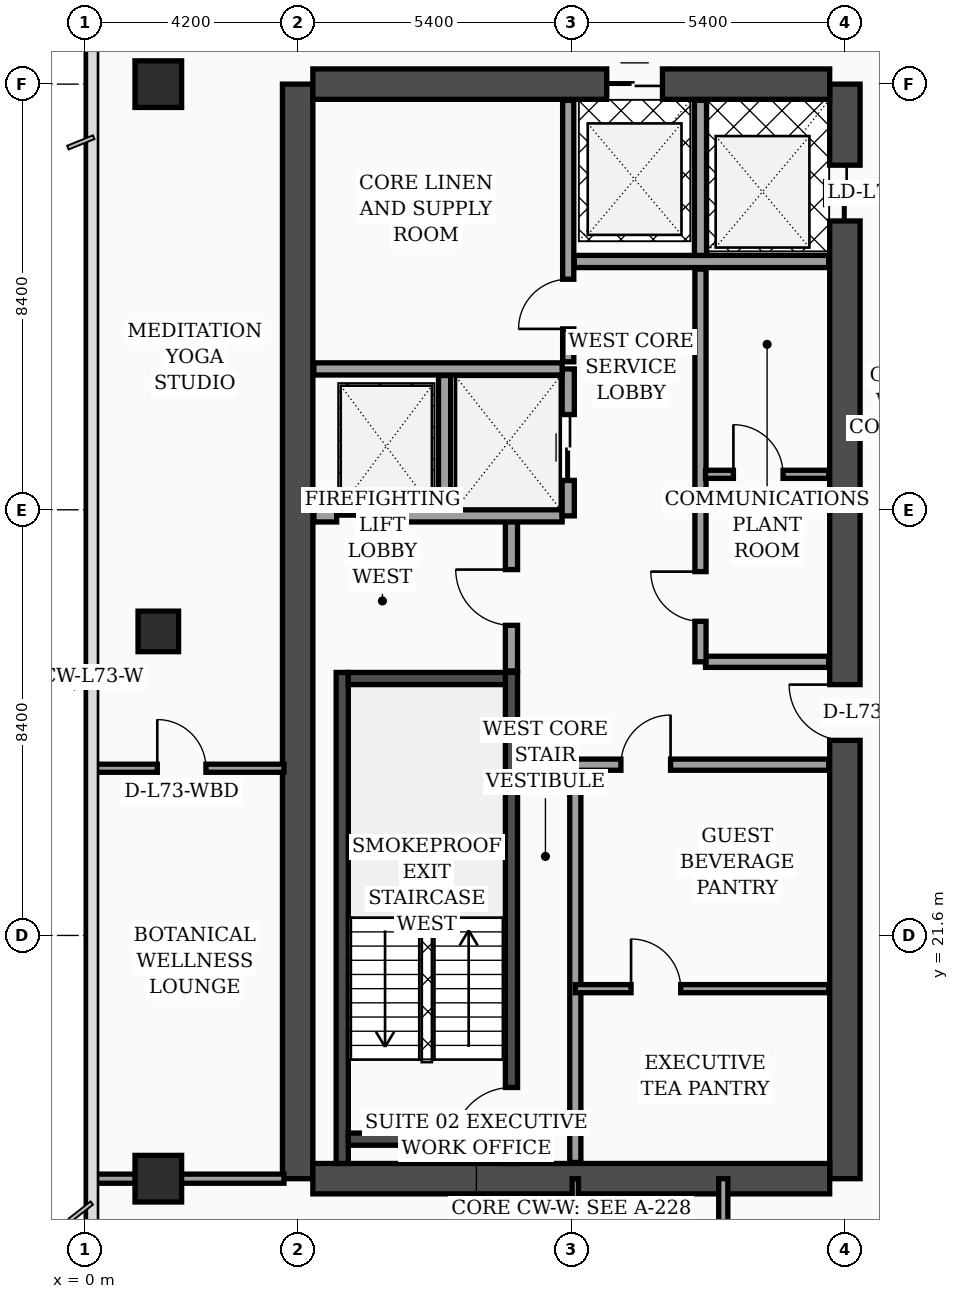
"""IFC4 building model, lengths in metres.
Left out: names, types, materials, properties, quantities, classifications, styles, units other than length and angle.
Written with IfcOpenShell. Run it as: python <this file> out.ifc"""

import sys

from ifc_helpers import new_model, si_unit, direction, frame, frame_2d, origin, origin_2d, place, context, subcontext, project, spatial, rectangle, extrude, element, fill, save


model = new_model("IFC4")
c1 = context("Model", 3, precision=1e-05, world=origin(), true_north=direction((0.0, 1.0)))
c2 = subcontext(c1, "Body", "Model", "MODEL_VIEW")
j1 = project(units=[si_unit("LENGTHUNIT", "METRE"), si_unit("PLANEANGLEUNIT", "RADIAN")], contexts=[c1])
p1 = place(None, origin())
s1 = spatial("IfcSite", under=j1, at=p1, CompositionType="ELEMENT")
p2 = place(p1, origin())
s2 = spatial("IfcBuilding", under=s1, at=p2, CompositionType="ELEMENT")
p3 = place(p2, frame((0.0, 0.0, 294.9)))
s3 = spatial("IfcBuildingStorey", under=s2, at=p3, CompositionType="ELEMENT", Elevation=294.9)
p4 = place(p3, frame((4.2, 16.8, 0.0), z_axis=(0.0, 0.0, 1.0), x_axis=(0.0, 1.0, 0.0)))
e1 = element("IfcWall", 1, at=p4, inside=s3, PredefinedType="SHEAR", context=c2, shape_type="SweptSolid", body=[
    extrude(rectangle(XDim=21.6, YDim=0.6, at=frame_2d((10.8, 0.0))), origin(), (0.0, 0.0, 1.0), 3.56),
])
p5 = place(p3, frame((15.0, 16.8, 0.0), z_axis=(0.0, 0.0, 1.0), x_axis=(0.0, 1.0, 0.0)))
e2 = element("IfcWall", 2, at=p5, inside=s3, PredefinedType="SHEAR", context=c2, shape_type="SweptSolid", body=[
    extrude(rectangle(XDim=21.6, YDim=0.6, at=frame_2d((10.8, 0.0))), origin(), (0.0, 0.0, 1.0), 3.56),
])
p6 = place(p5, frame((8.65, 0.0, 0.0)))
e3 = element("IfcOpeningElement", 3, at=p6, cuts=e2, PredefinedType="OPENING", context=c2, shape_type="SweptSolid", body=[
    extrude(rectangle(XDim=1.1, YDim=2.2, at=frame_2d((0.55, 1.1))), frame((0.0, 0.31, 0.0), z_axis=(0.0, -1.0, 0.0), x_axis=(1.0, 0.0, 0.0)), (0.0, 0.0, 1.0), 0.62),
])
p7 = place(p5, frame((18.9, 0.0, 0.0)))
e4 = element("IfcOpeningElement", 4, at=p7, cuts=e2, PredefinedType="OPENING", context=c2, shape_type="SweptSolid", body=[
    extrude(rectangle(XDim=1.1, YDim=2.2, at=frame_2d((0.55, 1.1))), frame((0.0, 0.31, 0.0), z_axis=(0.0, -1.0, 0.0), x_axis=(1.0, 0.0, 0.0)), (0.0, 0.0, 1.0), 0.62),
])
p8 = place(p3, frame((4.5, 38.4, 0.0), z_axis=(0.0, 0.0, 1.0), x_axis=(1.0, 0.0, 0.0)))
e5 = element("IfcWall", 5, at=p8, inside=s3, PredefinedType="SHEAR", context=c2, shape_type="SweptSolid", body=[
    extrude(rectangle(XDim=10.2, YDim=0.6, at=frame_2d((5.1, 0.0))), origin(), (0.0, 0.0, 1.0), 3.56),
])
p9 = place(p8, frame((5.8, 0.0, 0.0)))
e6 = element("IfcOpeningElement", 6, at=p9, cuts=e5, PredefinedType="OPENING", context=c2, shape_type="SweptSolid", body=[
    extrude(rectangle(XDim=1.1, YDim=2.2, at=frame_2d((0.55, 1.1))), frame((0.0, 0.31, 0.0), z_axis=(0.0, -1.0, 0.0), x_axis=(1.0, 0.0, 0.0)), (0.0, 0.0, 1.0), 0.62),
])
p10 = place(p3, frame((4.5, 16.8, 0.0), z_axis=(0.0, 0.0, 1.0), x_axis=(1.0, 0.0, 0.0)))
e7 = element("IfcWall", 7, at=p10, inside=s3, PredefinedType="SHEAR", context=c2, shape_type="SweptSolid", body=[
    extrude(rectangle(XDim=10.2, YDim=0.6, at=frame_2d((5.1, 0.0))), origin(), (0.0, 0.0, 1.0), 3.56),
])
p11 = place(p3, frame((5.08, 17.1, 0.0), z_axis=(0.0, 0.0, 1.0), x_axis=(0.0, 1.0, 0.0)))
e8 = element("IfcWall", 8, at=p11, inside=s3, PredefinedType="SOLIDWALL", context=c2, shape_type="SweptSolid", body=[
    extrude(rectangle(XDim=9.69, YDim=0.24, at=frame_2d((4.845, 0.0))), origin(), (0.0, 0.0, 1.0), 3.56),
])
p12 = place(p3, frame((8.42, 17.1, 0.0), z_axis=(0.0, 0.0, 1.0), x_axis=(0.0, 1.0, 0.0)))
e9 = element("IfcWall", 9, at=p12, inside=s3, PredefinedType="SOLIDWALL", context=c2, shape_type="SweptSolid", body=[
    extrude(rectangle(XDim=9.69, YDim=0.24, at=frame_2d((4.845, 0.0))), origin(), (0.0, 0.0, 1.0), 3.56),
])
p13 = place(p12, frame((0.35, 0.0, 0.0)))
e10 = element("IfcOpeningElement", 10, at=p13, cuts=e9, PredefinedType="OPENING", context=c2, shape_type="SweptSolid", body=[
    extrude(rectangle(XDim=1.15, YDim=2.2, at=frame_2d((0.575, 1.1))), frame((0.0, 0.13, 0.0), z_axis=(0.0, -1.0, 0.0), x_axis=(1.0, 0.0, 0.0)), (0.0, 0.0, 1.0), 0.26),
])
for number, where, z_axis, x_axis in (
    (11, (5.2, 17.58, 0.0), (0.0, 0.0, 1.0), (1.0, 0.0, 0.0)),
    (12, (5.2, 26.67, 0.0), (0.0, 0.0, 1.0), (1.0, 0.0, 0.0)),
):
    element("IfcWall", number, at=place(p3, frame(where, z_axis=z_axis, x_axis=x_axis)), inside=s3, PredefinedType="SOLIDWALL", context=c2, shape_type="SweptSolid", body=[
        extrude(rectangle(XDim=3.1, YDim=0.24, at=frame_2d((1.55, 0.0))), origin(), (0.0, 0.0, 1.0), 3.56),
    ])
p14 = place(p3, frame((1.45, 16.8, 0.0), z_axis=(0.0, 0.0, 1.0), x_axis=(1.0, 0.0, 0.0)))
e13 = element("IfcColumn", 13, at=p14, inside=s3, PredefinedType="COLUMN", context=c2, shape_type="SweptSolid", body=[
    extrude(rectangle(XDim=0.92, YDim=0.92, at=origin_2d()), origin(), (0.0, 0.0, 1.0), 3.56),
])
p15 = place(p3, frame((1.45, 27.6, 0.0), z_axis=(0.0, 0.0, 1.0), x_axis=(1.0, 0.0, 0.0)))
e14 = element("IfcColumn", 14, at=p15, inside=s3, PredefinedType="COLUMN", context=c2, shape_type="SweptSolid", body=[
    extrude(rectangle(XDim=0.8, YDim=0.8, at=origin_2d()), origin(), (0.0, 0.0, 1.0), 3.56),
])
p16 = place(p3, frame((1.45, 38.4, 0.0), z_axis=(0.0, 0.0, 1.0), x_axis=(1.0, 0.0, 0.0)))
e15 = element("IfcColumn", 15, at=p16, inside=s3, PredefinedType="COLUMN", context=c2, shape_type="SweptSolid", body=[
    extrude(rectangle(XDim=0.92, YDim=0.92, at=origin_2d()), origin(), (0.0, 0.0, 1.0), 3.56),
])
p17 = place(p3, frame((8.42, 26.82, 0.0), z_axis=(0.0, 0.0, 1.0), x_axis=(0.0, 1.0, 0.0)))
e16 = element("IfcWall", 16, at=p17, inside=s3, PredefinedType="SOLIDWALL", context=c2, shape_type="SweptSolid", body=[
    extrude(rectangle(XDim=3.0, YDim=0.24, at=frame_2d((1.5, 0.0))), origin(), (0.0, 0.0, 1.0), 3.56),
])
p18 = place(p17, frame((0.9, 0.0, 0.0)))
e17 = element("IfcOpeningElement", 17, at=p18, cuts=e16, PredefinedType="OPENING", context=c2, shape_type="SweptSolid", body=[
    extrude(rectangle(XDim=1.1, YDim=2.2, at=frame_2d((0.55, 1.1))), frame((0.0, 0.13, 0.0), z_axis=(0.0, -1.0, 0.0), x_axis=(1.0, 0.0, 0.0)), (0.0, 0.0, 1.0), 0.26),
])
p19 = place(p3, frame((4.52, 29.88, 0.0), z_axis=(0.0, 0.0, 1.0), x_axis=(1.0, 0.0, 0.0)))
e18 = element("IfcWall", 18, at=p19, inside=s3, PredefinedType="SOLIDWALL", context=c2, shape_type="SweptSolid", body=[
    extrude(rectangle(XDim=4.9, YDim=0.24, at=frame_2d((2.45, 0.0))), origin(), (0.0, 0.0, 1.0), 3.56),
])
p20 = place(p19, frame((0.45, 0.0, 0.0)))
e19 = element("IfcOpeningElement", 19, at=p20, cuts=e18, PredefinedType="OPENING", context=c2, shape_type="SweptSolid", body=[
    extrude(rectangle(XDim=1.3, YDim=2.35, at=frame_2d((0.65, 1.175))), frame((0.0, 0.13, 0.0), z_axis=(0.0, -1.0, 0.0), x_axis=(1.0, 0.0, 0.0)), (0.0, 0.0, 1.0), 0.26),
])
p21 = place(p3, frame((7.1, 30.02, 0.0), z_axis=(0.0, 0.0, 1.0), x_axis=(0.0, 1.0, 0.0)))
e20 = element("IfcWall", 20, at=p21, inside=s3, PredefinedType="SOLIDWALL", context=c2, shape_type="SweptSolid", body=[
    extrude(rectangle(XDim=2.63, YDim=0.24, at=frame_2d((1.315, 0.0))), origin(), (0.0, 0.0, 1.0), 3.56),
])
p22 = place(p3, frame((9.54, 29.88, 0.0), z_axis=(0.0, 0.0, 1.0), x_axis=(0.0, 1.0, 0.0)))
e21 = element("IfcWall", 21, at=p22, inside=s3, PredefinedType="SOLIDWALL", context=c2, shape_type="SweptSolid", body=[
    extrude(rectangle(XDim=2.9, YDim=0.24, at=frame_2d((1.45, 0.0))), origin(), (0.0, 0.0, 1.0), 3.56),
])
p23 = place(p22, frame((0.7, 0.0, 0.0)))
e22 = element("IfcOpeningElement", 22, at=p23, cuts=e21, PredefinedType="OPENING", context=c2, shape_type="SweptSolid", body=[
    extrude(rectangle(XDim=1.3, YDim=2.35, at=frame_2d((0.65, 1.175))), frame((0.0, 0.13, 0.0), z_axis=(0.0, -1.0, 0.0), x_axis=(1.0, 0.0, 0.0)), (0.0, 0.0, 1.0), 0.26),
])
p24 = place(p3, frame((4.52, 32.78, 0.0), z_axis=(0.0, 0.0, 1.0), x_axis=(1.0, 0.0, 0.0)))
e23 = element("IfcWall", 23, at=p24, inside=s3, PredefinedType="SOLIDWALL", context=c2, shape_type="SweptSolid", body=[
    extrude(rectangle(XDim=4.9, YDim=0.24, at=frame_2d((2.45, 0.0))), origin(), (0.0, 0.0, 1.0), 3.19),
])
p25 = place(p3, frame((9.68, 17.12, 0.0), z_axis=(0.0, 0.0, 1.0), x_axis=(0.0, 1.0, 0.0)))
e24 = element("IfcWall", 24, at=p25, inside=s3, PredefinedType="SOLIDWALL", context=c2, shape_type="SweptSolid", body=[
    extrude(rectangle(XDim=7.88, YDim=0.22, at=frame_2d((3.94, 0.0))), origin(), (0.0, 0.0, 1.0), 3.56),
])
p26 = place(p3, frame((9.54, 32.92, 0.0), z_axis=(0.0, 0.0, 1.0), x_axis=(0.0, 1.0, 0.0)))
e25 = element("IfcWall", 25, at=p26, inside=s3, PredefinedType="SOLIDWALL", context=c2, shape_type="SweptSolid", body=[
    extrude(rectangle(XDim=5.16, YDim=0.22, at=frame_2d((2.58, 0.0))), origin(), (0.0, 0.0, 1.0), 3.56),
])
p27 = place(p26, frame((0.65, 0.0, 0.0)))
e26 = element("IfcOpeningElement", 26, at=p27, cuts=e25, PredefinedType="OPENING", context=c2, shape_type="SweptSolid", body=[
    extrude(rectangle(XDim=0.98, YDim=2.15, at=frame_2d((0.49, 1.075))), frame((0.0, 0.12, 0.0), z_axis=(0.0, -1.0, 0.0), x_axis=(1.0, 0.0, 0.0)), (0.0, 0.0, 1.0), 0.24),
])
p28 = place(p3, frame((9.68, 20.55, 0.0), z_axis=(0.0, 0.0, 1.0), x_axis=(1.0, 0.0, 0.0)))
e27 = element("IfcWall", 27, at=p28, inside=s3, PredefinedType="PARTITIONING", context=c2, shape_type="SweptSolid", body=[
    extrude(rectangle(XDim=5.0, YDim=0.16, at=frame_2d((2.5, 0.0))), origin(), (0.0, 0.0, 1.0), 3.56),
])
p29 = place(p28, frame((1.1, 0.0, 0.0)))
e28 = element("IfcOpeningElement", 28, at=p29, cuts=e27, PredefinedType="OPENING", context=c2, shape_type="SweptSolid", body=[
    extrude(rectangle(XDim=0.98, YDim=2.15, at=frame_2d((0.49, 1.075))), frame((0.0, 0.09, 0.0), z_axis=(0.0, -1.0, 0.0), x_axis=(1.0, 0.0, 0.0)), (0.0, 0.0, 1.0), 0.18),
])
p30 = place(p3, frame((9.68, 24.97, 0.0), z_axis=(0.0, 0.0, 1.0), x_axis=(1.0, 0.0, 0.0)))
e29 = element("IfcWall", 29, at=p30, inside=s3, PredefinedType="SOLIDWALL", context=c2, shape_type="SweptSolid", body=[
    extrude(rectangle(XDim=5.0, YDim=0.22, at=frame_2d((2.5, 0.0))), origin(), (0.0, 0.0, 1.0), 2.99),
])
p31 = place(p30, frame((0.9, 0.0, 0.0)))
e30 = element("IfcOpeningElement", 30, at=p31, cuts=e29, PredefinedType="OPENING", context=c2, shape_type="SweptSolid", body=[
    extrude(rectangle(XDim=0.98, YDim=2.15, at=frame_2d((0.49, 1.075))), frame((0.0, 0.12, 0.0), z_axis=(0.0, -1.0, 0.0), x_axis=(1.0, 0.0, 0.0)), (0.0, 0.0, 1.0), 0.24),
])
p32 = place(p3, frame((12.25, 27.0, 0.0), z_axis=(0.0, 0.0, 1.0), x_axis=(1.0, 0.0, 0.0)))
e31 = element("IfcWall", 31, at=p32, inside=s3, PredefinedType="SOLIDWALL", context=c2, shape_type="SweptSolid", body=[
    extrude(rectangle(XDim=2.43, YDim=0.22, at=frame_2d((1.215, 0.0))), origin(), (0.0, 0.0, 1.0), 3.56),
])
p33 = place(p3, frame((12.15, 27.0, 0.0), z_axis=(0.0, 0.0, 1.0), x_axis=(0.0, 1.0, 0.0)))
e32 = element("IfcWall", 32, at=p33, inside=s3, PredefinedType="SOLIDWALL", context=c2, shape_type="SweptSolid", body=[
    extrude(rectangle(XDim=7.75, YDim=0.22, at=frame_2d((3.875, 0.0))), origin(), (0.0, 0.0, 1.0), 3.56),
])
p34 = place(p33, frame((0.8, 0.0, 0.0)))
e33 = element("IfcOpeningElement", 33, at=p34, cuts=e32, PredefinedType="OPENING", context=c2, shape_type="SweptSolid", body=[
    extrude(rectangle(XDim=0.98, YDim=2.15, at=frame_2d((0.49, 1.075))), frame((0.0, 0.12, 0.0), z_axis=(0.0, -1.0, 0.0), x_axis=(1.0, 0.0, 0.0)), (0.0, 0.0, 1.0), 0.24),
])
p35 = place(p3, frame((12.25, 30.7, 0.0), z_axis=(0.0, 0.0, 1.0), x_axis=(1.0, 0.0, 0.0)))
e34 = element("IfcWall", 34, at=p35, inside=s3, PredefinedType="PARTITIONING", context=c2, shape_type="SweptSolid", body=[
    extrude(rectangle(XDim=2.43, YDim=0.16, at=frame_2d((1.215, 0.0))), origin(), (0.0, 0.0, 1.0), 3.56),
])
p36 = place(p35, frame((0.55, 0.0, 0.0)))
e35 = element("IfcOpeningElement", 35, at=p36, cuts=e34, PredefinedType="OPENING", context=c2, shape_type="SweptSolid", body=[
    extrude(rectangle(XDim=0.98, YDim=2.15, at=frame_2d((0.49, 1.075))), frame((0.0, 0.09, 0.0), z_axis=(0.0, -1.0, 0.0), x_axis=(1.0, 0.0, 0.0)), (0.0, 0.0, 1.0), 0.18),
])
p37 = place(p3, frame((9.66, 34.9, 0.0), z_axis=(0.0, 0.0, 1.0), x_axis=(1.0, 0.0, 0.0)))
e36 = element("IfcWall", 36, at=p37, inside=s3, PredefinedType="SOLIDWALL", context=c2, shape_type="SweptSolid", body=[
    extrude(rectangle(XDim=5.02, YDim=0.24, at=frame_2d((2.51, 0.0))), origin(), (0.0, 0.0, 1.0), 3.56),
])
p38 = place(p3, frame((12.15, 35.02, 0.0), z_axis=(0.0, 0.0, 1.0), x_axis=(0.0, 1.0, 0.0)))
e37 = element("IfcWall", 37, at=p38, inside=s3, PredefinedType="SOLIDWALL", context=c2, shape_type="SweptSolid", body=[
    extrude(rectangle(XDim=3.06, YDim=0.24, at=frame_2d((1.53, 0.0))), origin(), (0.0, 0.0, 1.0), 3.56),
])
p39 = place(p3, frame((0.08, 24.9, 0.0), z_axis=(0.0, 0.0, 1.0), x_axis=(1.0, 0.0, 0.0)))
e38 = element("IfcWall", 38, at=p39, inside=s3, PredefinedType="PARTITIONING", context=c2, shape_type="SweptSolid", body=[
    extrude(rectangle(XDim=3.85, YDim=0.16, at=frame_2d((1.925, 0.0))), origin(), (0.0, 0.0, 1.0), 3.09),
])
p40 = place(p39, frame((1.35, 0.0, 0.0)))
e39 = element("IfcOpeningElement", 39, at=p40, cuts=e38, PredefinedType="OPENING", context=c2, shape_type="SweptSolid", body=[
    extrude(rectangle(XDim=0.96, YDim=2.2, at=frame_2d((0.48, 1.1))), frame((0.0, 0.09, 0.0), z_axis=(0.0, -1.0, 0.0), x_axis=(1.0, 0.0, 0.0)), (0.0, 0.0, 1.0), 0.18),
])
p41 = place(p3, frame((0.08, 16.8, 0.0), z_axis=(0.0, 0.0, 1.0), x_axis=(1.0, 0.0, 0.0)))
e40 = element("IfcWall", 40, at=p41, inside=s3, PredefinedType="PARTITIONING", context=c2, shape_type="SweptSolid", body=[
    extrude(rectangle(XDim=3.85, YDim=0.18, at=frame_2d((1.925, 0.0))), origin(), (0.0, 0.0, 1.0), 2.99),
])
p42 = place(p3, frame((9.68, 14.75, 0.0), z_axis=(0.0, 0.0, 1.0), x_axis=(0.0, 1.0, 0.0)))
e41 = element("IfcWall", 41, at=p42, inside=s3, PredefinedType="PARTITIONING", context=c2, shape_type="SweptSolid", body=[
    extrude(rectangle(XDim=2.05, YDim=0.125, at=frame_2d((1.025, 0.0))), origin(), (0.0, 0.0, 1.0), 3.56),
])
p43 = place(p3, frame((12.6, 2.44, 0.0), z_axis=(0.0, 0.0, 1.0), x_axis=(0.0, 1.0, 0.0)))
e42 = element("IfcWall", 42, at=p43, inside=s3, PredefinedType="PARTITIONING", context=c2, shape_type="SweptSolid", body=[
    extrude(rectangle(XDim=14.36, YDim=0.18, at=frame_2d((7.18, 0.0))), origin(), (0.0, 0.0, 1.0), 2.99),
])
p44 = place(p43, frame((3.01, 0.0, 0.0)))
e43 = element("IfcOpeningElement", 43, at=p44, cuts=e42, PredefinedType="OPENING", context=c2, shape_type="SweptSolid", body=[
    extrude(rectangle(XDim=1.02, YDim=2.2, at=frame_2d((0.51, 1.1))), frame((0.0, 0.1, 0.0), z_axis=(0.0, -1.0, 0.0), x_axis=(1.0, 0.0, 0.0)), (0.0, 0.0, 1.0), 0.2),
])
p45 = place(p43, frame((9.35, 0.0, 0.0)))
e44 = element("IfcOpeningElement", 44, at=p45, cuts=e42, PredefinedType="OPENING", context=c2, shape_type="SweptSolid", body=[
    extrude(rectangle(XDim=1.02, YDim=2.2, at=frame_2d((0.51, 1.1))), frame((0.0, 0.1, 0.0), z_axis=(0.0, -1.0, 0.0), x_axis=(1.0, 0.0, 0.0)), (0.0, 0.0, 1.0), 0.2),
])
p46 = place(p18, origin())
e45 = element("IfcDoor", 45, at=p46, inside=s3, OperationType="SINGLE_SWING_RIGHT", PredefinedType="DOOR", context=c2, shape_type="SweptSolid", body=[
    extrude(rectangle(XDim=1.1, YDim=2.2, at=frame_2d((0.55, 1.1))), frame((0.0, 0.025, 0.0), z_axis=(0.0, -1.0, 0.0), x_axis=(1.0, 0.0, 0.0)), (0.0, 0.0, 1.0), 0.05),
])
fill(e17, e45)
p47 = place(p20, origin())
e46 = element("IfcDoor", 46, at=p47, inside=s3, OperationType="DOUBLE_DOOR_SLIDING", PredefinedType="DOOR", context=c2, shape_type="SweptSolid", body=[
    extrude(rectangle(XDim=1.3, YDim=2.35, at=frame_2d((0.65, 1.175))), frame((0.0, 0.025, 0.0), z_axis=(0.0, -1.0, 0.0), x_axis=(1.0, 0.0, 0.0)), (0.0, 0.0, 1.0), 0.05),
])
fill(e19, e46)
p48 = place(p23, origin())
e47 = element("IfcDoor", 47, at=p48, inside=s3, OperationType="DOUBLE_DOOR_SLIDING", PredefinedType="DOOR", context=c2, shape_type="SweptSolid", body=[
    extrude(rectangle(XDim=1.3, YDim=2.35, at=frame_2d((0.65, 1.175))), frame((0.0, 0.025, 0.0), z_axis=(0.0, -1.0, 0.0), x_axis=(1.0, 0.0, 0.0)), (0.0, 0.0, 1.0), 0.05),
])
fill(e22, e47)
p49 = place(p27, origin())
e48 = element("IfcDoor", 48, at=p49, inside=s3, OperationType="SINGLE_SWING_LEFT", PredefinedType="DOOR", context=c2, shape_type="SweptSolid", body=[
    extrude(rectangle(XDim=0.98, YDim=2.15, at=frame_2d((0.49, 1.075))), frame((0.0, 0.025, 0.0), z_axis=(0.0, -1.0, 0.0), x_axis=(1.0, 0.0, 0.0)), (0.0, 0.0, 1.0), 0.05),
])
fill(e26, e48)
p50 = place(p29, origin())
e49 = element("IfcDoor", 49, at=p50, inside=s3, OperationType="SINGLE_SWING_LEFT", PredefinedType="DOOR", context=c2, shape_type="SweptSolid", body=[
    extrude(rectangle(XDim=0.98, YDim=2.15, at=frame_2d((0.49, 1.075))), frame((0.0, 0.025, 0.0), z_axis=(0.0, -1.0, 0.0), x_axis=(1.0, 0.0, 0.0)), (0.0, 0.0, 1.0), 0.05),
])
fill(e28, e49)
p51 = place(p31, origin())
e50 = element("IfcDoor", 50, at=p51, inside=s3, OperationType="SINGLE_SWING_RIGHT", PredefinedType="DOOR", context=c2, shape_type="SweptSolid", body=[
    extrude(rectangle(XDim=0.98, YDim=2.15, at=frame_2d((0.49, 1.075))), frame((0.0, 0.025, 0.0), z_axis=(0.0, -1.0, 0.0), x_axis=(1.0, 0.0, 0.0)), (0.0, 0.0, 1.0), 0.05),
])
fill(e30, e50)
p52 = place(p34, origin())
e51 = element("IfcDoor", 51, at=p52, inside=s3, OperationType="SINGLE_SWING_RIGHT", PredefinedType="DOOR", context=c2, shape_type="SweptSolid", body=[
    extrude(rectangle(XDim=0.98, YDim=2.15, at=frame_2d((0.49, 1.075))), frame((0.0, 0.025, 0.0), z_axis=(0.0, -1.0, 0.0), x_axis=(1.0, 0.0, 0.0)), (0.0, 0.0, 1.0), 0.05),
])
fill(e33, e51)
p53 = place(p36, origin())
e52 = element("IfcDoor", 52, at=p53, inside=s3, OperationType="SINGLE_SWING_LEFT", PredefinedType="DOOR", context=c2, shape_type="SweptSolid", body=[
    extrude(rectangle(XDim=0.98, YDim=2.15, at=frame_2d((0.49, 1.075))), frame((0.0, 0.025, 0.0), z_axis=(0.0, -1.0, 0.0), x_axis=(1.0, 0.0, 0.0)), (0.0, 0.0, 1.0), 0.05),
])
fill(e35, e52)
p54 = place(p40, origin())
e53 = element("IfcDoor", 53, at=p54, inside=s3, OperationType="SINGLE_SWING_LEFT", PredefinedType="DOOR", context=c2, shape_type="SweptSolid", body=[
    extrude(rectangle(XDim=0.96, YDim=2.2, at=frame_2d((0.48, 1.1))), frame((0.0, 0.025, 0.0), z_axis=(0.0, -1.0, 0.0), x_axis=(1.0, 0.0, 0.0)), (0.0, 0.0, 1.0), 0.05),
])
fill(e39, e53)
p55 = place(p13, origin())
e54 = element("IfcDoor", 54, at=p55, inside=s3, OperationType="SINGLE_SWING_LEFT", PredefinedType="DOOR", context=c2, shape_type="SweptSolid", body=[
    extrude(rectangle(XDim=1.15, YDim=2.2, at=frame_2d((0.575, 1.1))), frame((0.0, 0.025, 0.0), z_axis=(0.0, -1.0, 0.0), x_axis=(1.0, 0.0, 0.0)), (0.0, 0.0, 1.0), 0.05),
])
fill(e10, e54)
p56 = place(p6, origin())
e55 = element("IfcDoor", 55, at=p56, inside=s3, OperationType="SINGLE_SWING_RIGHT", PredefinedType="DOOR", context=c2, shape_type="SweptSolid", body=[
    extrude(rectangle(XDim=1.1, YDim=2.2, at=frame_2d((0.55, 1.1))), frame((0.0, 0.025, 0.0), z_axis=(0.0, -1.0, 0.0), x_axis=(1.0, 0.0, 0.0)), (0.0, 0.0, 1.0), 0.05),
])
fill(e3, e55)
p57 = place(p7, origin())
e56 = element("IfcDoor", 56, at=p57, inside=s3, OperationType="DOUBLE_DOOR_SLIDING", PredefinedType="DOOR", context=c2, shape_type="SweptSolid", body=[
    extrude(rectangle(XDim=1.1, YDim=2.2, at=frame_2d((0.55, 1.1))), frame((0.0, 0.025, 0.0), z_axis=(0.0, -1.0, 0.0), x_axis=(1.0, 0.0, 0.0)), (0.0, 0.0, 1.0), 0.05),
])
fill(e4, e56)
p58 = place(p9, origin())
e57 = element("IfcDoor", 57, at=p58, inside=s3, OperationType="DOUBLE_DOOR_SLIDING", PredefinedType="DOOR", context=c2, shape_type="SweptSolid", body=[
    extrude(rectangle(XDim=1.1, YDim=2.2, at=frame_2d((0.55, 1.1))), frame((0.0, 0.025, 0.0), z_axis=(0.0, -1.0, 0.0), x_axis=(1.0, 0.0, 0.0)), (0.0, 0.0, 1.0), 0.05),
])
fill(e6, e57)
save(model, sys.argv[1])
